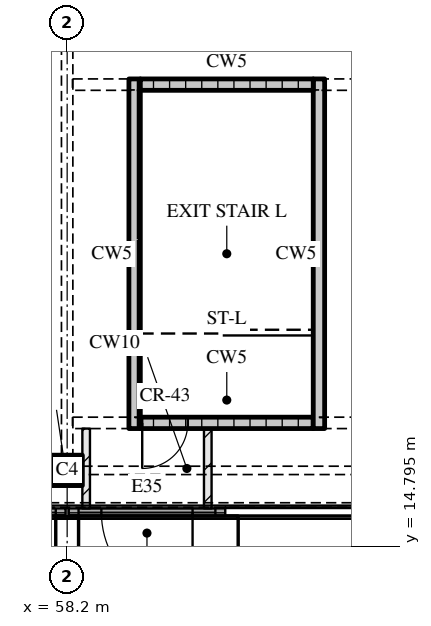
"""IFC4 building model, lengths in metres.
Left out: names, types, materials, properties, quantities, classifications, styles, units other than length and angle.
Written with IfcOpenShell. Run it as: python <this file> out.ifc"""

import sys

from ifc_helpers import new_model, si_unit, direction, frame, frame_2d, origin, origin_2d, place, context, subcontext, project, spatial, rectangle, extrude, element, fill, save


model = new_model("IFC4")
c1 = context("Model", 3, precision=1e-05, world=origin(), true_north=direction((0.0, 1.0)))
c2 = subcontext(c1, "Body", "Model", "MODEL_VIEW")
j1 = project(units=[si_unit("LENGTHUNIT", "METRE"), si_unit("PLANEANGLEUNIT", "RADIAN")], contexts=[c1])
p1 = place(None, origin())
s1 = spatial("IfcSite", under=j1, at=p1, CompositionType="ELEMENT")
p2 = place(p1, origin())
s2 = spatial("IfcBuilding", under=s1, at=p2, CompositionType="ELEMENT")
p3 = place(p2, origin())
s3 = spatial("IfcBuildingStorey", under=s2, at=p3, CompositionType="ELEMENT", Elevation=0.0)
p4 = place(p3, frame((58.2, 16.8, 0.0), z_axis=(0.0, 0.0, 1.0), x_axis=(1.0, 0.0, 0.0)))
e1 = element("IfcColumn", 1, at=p4, inside=s3, PredefinedType="COLUMN", context=c2, shape_type="SweptSolid", body=[
    extrude(rectangle(XDim=0.8, YDim=0.8, at=origin_2d()), origin(), (0.0, 0.0, 1.0), 9.0),
])
p5 = place(p3, frame((58.16, 15.7, 0.0), z_axis=(0.0, 0.0, 1.0), x_axis=(-1.0, 0.0, 0.0)))
e2 = element("IfcWall", 2, at=p5, inside=s3, PredefinedType="SOLIDWALL", context=c2, shape_type="SweptSolid", body=[
    extrude(rectangle(XDim=4.12, YDim=0.2, at=frame_2d((2.06, 0.0))), origin(), (0.0, 0.0, 1.0), 8.7),
])
p6 = place(p5, frame((1.06, 0.0, 0.0)))
e3 = element("IfcOpeningElement", 3, at=p6, cuts=e2, PredefinedType="OPENING", context=c2, shape_type="SweptSolid", body=[
    extrude(rectangle(XDim=2.0, YDim=2.4, at=frame_2d((1.0, 1.2))), frame((0.0, 0.11, 0.0), z_axis=(0.0, -1.0, 0.0), x_axis=(1.0, 0.0, 0.0)), (0.0, 0.0, 1.0), 0.22),
])
p7 = place(p5, frame((0.26, 0.0, 2.7)))
e4 = element("IfcOpeningElement", 4, at=p7, cuts=e2, PredefinedType="OPENING", context=c2, shape_type="SweptSolid", body=[
    extrude(rectangle(XDim=3.6, YDim=5.6, at=frame_2d((1.8, 2.8))), frame((0.0, 0.11, 0.0), z_axis=(0.0, -1.0, 0.0), x_axis=(1.0, 0.0, 0.0)), (0.0, 0.0, 1.0), 0.22),
])
p8 = place(p3, frame((62.36, 15.7, 0.0), z_axis=(0.0, 0.0, 1.0), x_axis=(-1.0, 0.0, 0.0)))
e5 = element("IfcWall", 5, at=p8, inside=s3, PredefinedType="SOLIDWALL", context=c2, shape_type="SweptSolid", body=[
    extrude(rectangle(XDim=4.12, YDim=0.2, at=frame_2d((2.06, 0.0))), origin(), (0.0, 0.0, 1.0), 8.7),
])
p9 = place(p8, frame((0.86, 0.0, 0.0)))
e6 = element("IfcOpeningElement", 6, at=p9, cuts=e5, PredefinedType="OPENING", context=c2, shape_type="SweptSolid", body=[
    extrude(rectangle(XDim=2.4, YDim=2.4, at=frame_2d((1.2, 1.2))), frame((0.0, 0.11, 0.0), z_axis=(0.0, -1.0, 0.0), x_axis=(1.0, 0.0, 0.0)), (0.0, 0.0, 1.0), 0.22),
])
p10 = place(p8, frame((0.26, 0.0, 2.7)))
e7 = element("IfcOpeningElement", 7, at=p10, cuts=e5, PredefinedType="OPENING", context=c2, shape_type="SweptSolid", body=[
    extrude(rectangle(XDim=3.6, YDim=5.6, at=frame_2d((1.8, 2.8))), frame((0.0, 0.11, 0.0), z_axis=(0.0, -1.0, 0.0), x_axis=(1.0, 0.0, 0.0)), (0.0, 0.0, 1.0), 0.22),
])
p11 = place(p3, frame((59.975, 17.9, 0.0), z_axis=(0.0, 0.0, 1.0), x_axis=(0.0, 1.0, 0.0)))
e8 = element("IfcWall", 8, at=p11, inside=s3, PredefinedType="SOLIDWALL", context=c2, shape_type="SweptSolid", body=[
    extrude(rectangle(XDim=9.2, YDim=0.3, at=frame_2d((4.6, 0.0))), origin(), (0.0, 0.0, 1.0), 8.7),
])
p12 = place(p3, frame((60.125, 18.05, 0.0), z_axis=(0.0, 0.0, 1.0), x_axis=(1.0, 0.0, 0.0)))
e9 = element("IfcWall", 9, at=p12, inside=s3, PredefinedType="SOLIDWALL", context=c2, shape_type="SweptSolid", body=[
    extrude(rectangle(XDim=4.55, YDim=0.3, at=frame_2d((2.275, 0.0))), origin(), (0.0, 0.0, 1.0), 8.7),
])
p13 = place(p12, frame((0.05, 0.0, 0.0)))
e10 = element("IfcOpeningElement", 10, at=p13, cuts=e9, PredefinedType="OPENING", context=c2, shape_type="SweptSolid", body=[
    extrude(rectangle(XDim=1.2, YDim=2.1, at=frame_2d((0.6, 1.05))), frame((0.0, 0.16, 0.0), z_axis=(0.0, -1.0, 0.0), x_axis=(1.0, 0.0, 0.0)), (0.0, 0.0, 1.0), 0.32),
])
p14 = place(p3, frame((64.825, 17.9, 0.0), z_axis=(0.0, 0.0, 1.0), x_axis=(0.0, 1.0, 0.0)))
e11 = element("IfcWall", 11, at=p14, inside=s3, PredefinedType="SOLIDWALL", context=c2, shape_type="SweptSolid", body=[
    extrude(rectangle(XDim=9.2, YDim=0.3, at=frame_2d((4.6, 0.0))), origin(), (0.0, 0.0, 1.0), 8.7),
])
p15 = place(p3, frame((60.125, 26.95, 0.0), z_axis=(0.0, 0.0, 1.0), x_axis=(1.0, 0.0, 0.0)))
e12 = element("IfcWall", 12, at=p15, inside=s3, PredefinedType="SOLIDWALL", context=c2, shape_type="SweptSolid", body=[
    extrude(rectangle(XDim=4.55, YDim=0.3, at=frame_2d((2.275, 0.0))), origin(), (0.0, 0.0, 1.0), 8.7),
])
for number, where, z_axis, x_axis in (
    (13, (58.7, 15.8, 0.0), (0.0, 0.0, 1.0), (0.0, 1.0, 0.0)),
    (14, (61.9, 15.8, 0.0), (0.0, 0.0, 1.0), (0.0, 1.0, 0.0)),
):
    element("IfcWall", number, at=place(p3, frame(where, z_axis=z_axis, x_axis=x_axis)), inside=s3, PredefinedType="PARTITIONING", context=c2, shape_type="SweptSolid", body=[
        extrude(rectangle(XDim=2.1, YDim=0.2, at=frame_2d((1.05, 0.0))), origin(), (0.0, 0.0, 1.0), 8.7),
    ])
p16 = place(p7, origin())
e15 = element("IfcWindow", 15, at=p16, inside=s3, PartitioningType="SINGLE_PANEL", PredefinedType="WINDOW", context=c2, shape_type="SweptSolid", body=[
    extrude(rectangle(XDim=3.6, YDim=5.6, at=frame_2d((1.8, 2.8))), frame((0.0, 0.03, 0.0), z_axis=(0.0, -1.0, 0.0), x_axis=(1.0, 0.0, 0.0)), (0.0, 0.0, 1.0), 0.06),
])
fill(e4, e15)
p17 = place(p9, origin())
e16 = element("IfcDoor", 16, at=p17, inside=s3, OperationType="DOUBLE_DOOR_SINGLE_SWING", PredefinedType="DOOR", context=c2, shape_type="SweptSolid", body=[
    extrude(rectangle(XDim=2.4, YDim=2.4, at=frame_2d((1.2, 1.2))), frame((0.0, 0.025, 0.0), z_axis=(0.0, -1.0, 0.0), x_axis=(1.0, 0.0, 0.0)), (0.0, 0.0, 1.0), 0.05),
])
fill(e6, e16)
p18 = place(p10, origin())
e17 = element("IfcWindow", 17, at=p18, inside=s3, PartitioningType="SINGLE_PANEL", PredefinedType="WINDOW", context=c2, shape_type="SweptSolid", body=[
    extrude(rectangle(XDim=3.6, YDim=5.6, at=frame_2d((1.8, 2.8))), frame((0.0, 0.03, 0.0), z_axis=(0.0, -1.0, 0.0), x_axis=(1.0, 0.0, 0.0)), (0.0, 0.0, 1.0), 0.06),
])
fill(e7, e17)
p19 = place(p13, origin())
e18 = element("IfcDoor", 18, at=p19, inside=s3, OperationType="SINGLE_SWING_RIGHT", PredefinedType="DOOR", context=c2, shape_type="SweptSolid", body=[
    extrude(rectangle(XDim=1.2, YDim=2.1, at=frame_2d((0.6, 1.05))), frame((0.0, 0.025, 0.0), z_axis=(0.0, -1.0, 0.0), x_axis=(1.0, 0.0, 0.0)), (0.0, 0.0, 1.0), 0.05),
])
fill(e10, e18)
save(model, sys.argv[1])
